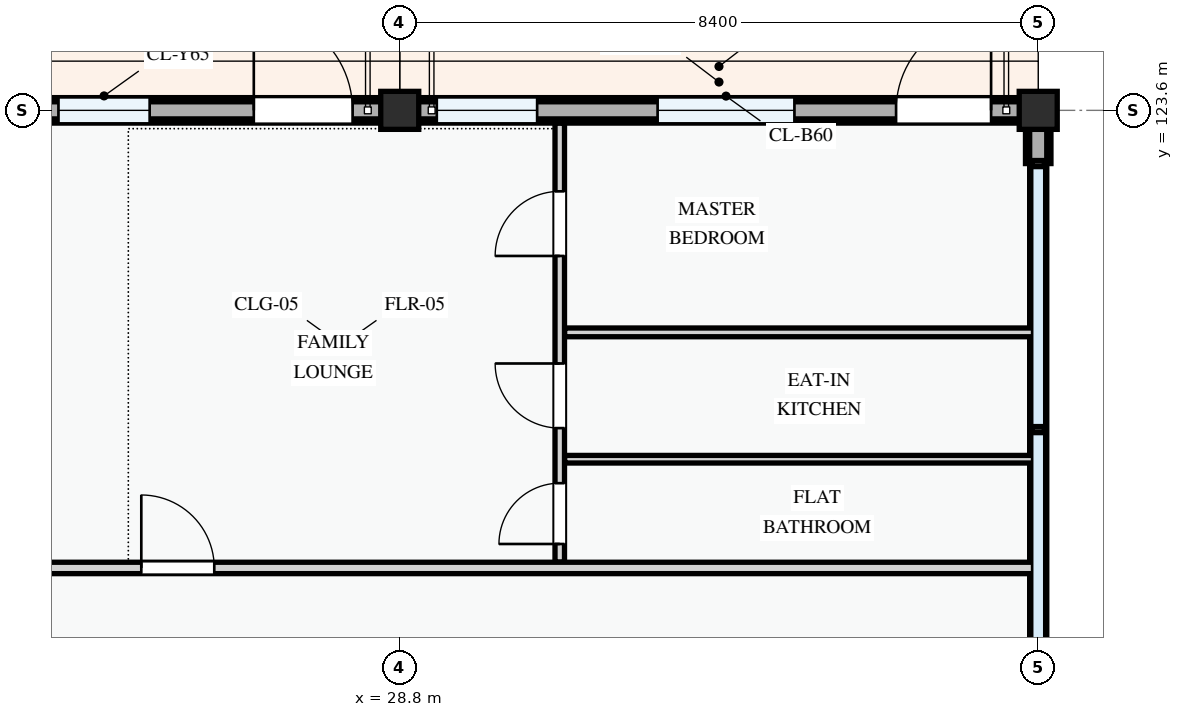
"""IFC4 building model, lengths in metres.
Left out: names, types, materials, properties, quantities, classifications, styles, units other than length and angle.
Written with IfcOpenShell. Run it as: python <this file> out.ifc"""

import sys

from ifc_helpers import new_model, si_unit, direction, frame, frame_2d, origin, origin_2d, place, context, subcontext, project, spatial, polyline, rectangle, outline, extrude, element, fill, save


model = new_model("IFC4")
c1 = context("Model", 3, precision=1e-05, world=origin(), true_north=direction((0.0, 1.0)))
c2 = subcontext(c1, "Body", "Model", "MODEL_VIEW")
j1 = project(units=[si_unit("LENGTHUNIT", "METRE"), si_unit("PLANEANGLEUNIT", "RADIAN")], contexts=[c1])
p1 = place(None, origin())
s1 = spatial("IfcSite", under=j1, at=p1, CompositionType="ELEMENT")
p2 = place(p1, origin())
s2 = spatial("IfcBuilding", under=s1, at=p2, CompositionType="ELEMENT")
p3 = place(p2, frame((0.0, 0.0, 51.0)))
s3 = spatial("IfcBuildingStorey", under=s2, at=p3, CompositionType="ELEMENT", Elevation=51.0)
for number, where, z_axis, x_axis in (
    (1, (28.8, 123.6, 0.0), (0.0, 0.0, 1.0), (1.0, 0.0, 0.0)),
    (2, (37.2, 123.6, 0.0), (0.0, 0.0, 1.0), (1.0, 0.0, 0.0)),
):
    element("IfcColumn", number, at=place(p3, frame(where, z_axis=z_axis, x_axis=x_axis)), inside=s3, PredefinedType="COLUMN", context=c2, shape_type="SweptSolid", body=[
        extrude(rectangle(XDim=0.5, YDim=0.5, at=origin_2d()), origin(), (0.0, 0.0, 1.0), 3.3),
    ])
p4 = place(p3, frame((37.2, 122.9, 0.0), z_axis=(0.0, 0.0, 1.0), x_axis=(0.0, 1.0, 0.0)))
e3 = element("IfcWall", 3, at=p4, inside=s3, PredefinedType="STANDARD", context=c2, shape_type="SweptSolid", body=[
    extrude(rectangle(XDim=0.531, YDim=0.335, at=frame_2d((0.265, 0.0))), origin(), (0.0, 0.0, 1.0), 2.445),
])
p5 = place(p3, frame((37.2, 123.6, 0.0), z_axis=(0.0, 0.0, 1.0), x_axis=(-1.0, 0.0, 0.0)))
e4 = element("IfcWall", 4, at=p5, inside=s3, PredefinedType="STANDARD", context=c2, shape_type="SweptSolid", body=[
    extrude(rectangle(XDim=8.4, YDim=0.335, at=frame_2d((4.2, 0.0))), origin(), (0.0, 0.0, 1.0), 2.395),
])
p6 = place(p5, frame((0.62, 0.0, 0.0)))
e5 = element("IfcOpeningElement", 5, at=p6, cuts=e4, PredefinedType="OPENING", context=c2, shape_type="SweptSolid", body=[
    extrude(rectangle(XDim=1.25, YDim=2.2, at=frame_2d((0.625, 1.1))), frame((0.0, 0.177, 0.0), z_axis=(0.0, -1.0, 0.0), x_axis=(1.0, 0.0, 0.0)), (0.0, 0.0, 1.0), 0.355),
])
p7 = place(p5, frame((3.208, 0.0, 0.78)))
e6 = element("IfcOpeningElement", 6, at=p7, cuts=e4, PredefinedType="OPENING", context=c2, shape_type="SweptSolid", body=[
    extrude(rectangle(XDim=1.8, YDim=1.5, at=frame_2d((0.9, 0.75))), frame((0.0, 0.177, 0.0), z_axis=(0.0, -1.0, 0.0), x_axis=(1.0, 0.0, 0.0)), (0.0, 0.0, 1.0), 0.355),
])
p8 = place(p5, frame((6.592, 0.0, 0.78)))
e7 = element("IfcOpeningElement", 7, at=p8, cuts=e4, PredefinedType="OPENING", context=c2, shape_type="SweptSolid", body=[
    extrude(rectangle(XDim=1.32, YDim=1.35, at=frame_2d((0.66, 0.675))), frame((0.0, 0.177, 0.0), z_axis=(0.0, -1.0, 0.0), x_axis=(1.0, 0.0, 0.0)), (0.0, 0.0, 1.0), 0.355),
])
p9 = place(p3, frame((28.8, 123.6, 0.0), z_axis=(0.0, 0.0, 1.0), x_axis=(-1.0, 0.0, 0.0)))
e8 = element("IfcWall", 8, at=p9, inside=s3, PredefinedType="STANDARD", context=c2, shape_type="SweptSolid", body=[
    extrude(rectangle(XDim=6.0, YDim=0.335, at=frame_2d((3.0, 0.0))), origin(), (0.0, 0.0, 1.0), 2.545),
])
p10 = place(p9, frame((0.62, 0.0, 0.0)))
e9 = element("IfcOpeningElement", 9, at=p10, cuts=e8, PredefinedType="OPENING", context=c2, shape_type="SweptSolid", body=[
    extrude(rectangle(XDim=1.3, YDim=2.15, at=frame_2d((0.65, 1.075))), frame((0.0, 0.177, 0.0), z_axis=(0.0, -1.0, 0.0), x_axis=(1.0, 0.0, 0.0)), (0.0, 0.0, 1.0), 0.355),
])
p11 = place(p9, frame((3.29, 0.0, 0.78)))
e10 = element("IfcOpeningElement", 10, at=p11, cuts=e8, PredefinedType="OPENING", context=c2, shape_type="SweptSolid", body=[
    extrude(rectangle(XDim=1.2, YDim=1.35, at=frame_2d((0.6, 0.675))), frame((0.0, 0.177, 0.0), z_axis=(0.0, -1.0, 0.0), x_axis=(1.0, 0.0, 0.0)), (0.0, 0.0, 1.0), 0.355),
])
p12 = place(p3, frame((37.2, 109.2, 3.3), z_axis=(0.0, 0.0, 1.0), x_axis=(0.0, 1.0, 0.0)))
e11 = element("IfcWall", 11, at=p12, inside=s3, PredefinedType="PARAPET", context=c2, shape_type="SweptSolid", body=[
    extrude(rectangle(XDim=14.4, YDim=0.225, at=frame_2d((7.2, 0.0))), origin(), (0.0, 0.0, 1.0), 1.15),
])
p13 = place(p3, frame((37.2, 123.6, 3.3), z_axis=(0.0, 0.0, 1.0), x_axis=(-1.0, 0.0, 0.0)))
e12 = element("IfcWall", 12, at=p13, inside=s3, PredefinedType="PARAPET", context=c2, shape_type="SweptSolid", body=[
    extrude(outline(polyline([(0.0, 0.0), (8.4, 0.0), (8.4, 1.12), (7.7, 1.322), (7.0, 1.484), (6.3, 1.618), (5.6, 1.717), (4.9, 1.779), (4.2, 1.8), (3.5, 1.779), (2.8, 1.717), (2.1, 1.618), (1.4, 1.484), (0.7, 1.322), (0.0, 1.12), (0.0, 0.0)])), frame((0.0, 0.113, 0.0), z_axis=(0.0, -1.0, 0.0), x_axis=(1.0, 0.0, 0.0)), (0.0, 0.0, 1.0), 0.225),
])
p14 = place(p3, frame((28.8, 123.6, 3.3), z_axis=(0.0, 0.0, 1.0), x_axis=(-1.0, 0.0, 0.0)))
e13 = element("IfcWall", 13, at=p14, inside=s3, PredefinedType="PARAPET", context=c2, shape_type="SweptSolid", body=[
    extrude(outline(polyline([(0.0, 0.0), (6.0, 0.0), (6.0, 1.12), (5.5, 1.322), (5.0, 1.484), (4.5, 1.618), (4.0, 1.717), (3.5, 1.779), (3.0, 1.8), (2.5, 1.779), (2.0, 1.717), (1.5, 1.618), (1.0, 1.484), (0.5, 1.322), (0.0, 1.12), (0.0, 0.0)])), frame((0.0, 0.113, 0.0), z_axis=(0.0, -1.0, 0.0), x_axis=(1.0, 0.0, 0.0)), (0.0, 0.0, 1.0), 0.225),
])
p15 = place(p3, frame((30.905, 117.657, 0.0), z_axis=(0.0, 0.0, 1.0), x_axis=(0.0, 1.0, 0.0)))
e14 = element("IfcWall", 14, at=p15, inside=s3, PredefinedType="PARTITIONING", context=c2, shape_type="SweptSolid", body=[
    extrude(rectangle(XDim=5.773, YDim=0.125, at=frame_2d((2.887, 0.0))), origin(), (0.0, 0.0, 1.0), 3.0),
])
p16 = place(p15, frame((0.238, 0.0, 0.0)))
e15 = element("IfcOpeningElement", 15, at=p16, cuts=e14, PredefinedType="OPENING", context=c2, shape_type="SweptSolid", body=[
    extrude(rectangle(XDim=0.8, YDim=2.1, at=frame_2d((0.4, 1.05))), frame((0.0, 0.073, 0.0), z_axis=(0.0, -1.0, 0.0), x_axis=(1.0, 0.0, 0.0)), (0.0, 0.0, 1.0), 0.145),
])
p17 = place(p15, frame((1.763, 0.0, 0.0)))
e16 = element("IfcOpeningElement", 16, at=p17, cuts=e14, PredefinedType="OPENING", context=c2, shape_type="SweptSolid", body=[
    extrude(rectangle(XDim=0.85, YDim=2.1, at=frame_2d((0.425, 1.05))), frame((0.0, 0.073, 0.0), z_axis=(0.0, -1.0, 0.0), x_axis=(1.0, 0.0, 0.0)), (0.0, 0.0, 1.0), 0.145),
])
p18 = place(p15, frame((4.028, 0.0, 0.0)))
e17 = element("IfcOpeningElement", 17, at=p18, cuts=e14, PredefinedType="OPENING", context=c2, shape_type="SweptSolid", body=[
    extrude(rectangle(XDim=0.85, YDim=2.1, at=frame_2d((0.425, 1.05))), frame((0.0, 0.073, 0.0), z_axis=(0.0, -1.0, 0.0), x_axis=(1.0, 0.0, 0.0)), (0.0, 0.0, 1.0), 0.145),
])
p19 = place(p3, frame((30.97, 120.679, 0.0), z_axis=(0.0, 0.0, 1.0), x_axis=(1.0, 0.0, 0.0)))
e18 = element("IfcWall", 18, at=p19, inside=s3, PredefinedType="PARTITIONING", context=c2, shape_type="SweptSolid", body=[
    extrude(rectangle(XDim=6.17, YDim=0.115, at=frame_2d((3.085, 0.0))), origin(), (0.0, 0.0, 1.0), 3.0),
])
p20 = place(p3, frame((30.97, 119.01, 0.0), z_axis=(0.0, 0.0, 1.0), x_axis=(1.0, 0.0, 0.0)))
e19 = element("IfcWall", 19, at=p20, inside=s3, PredefinedType="PARTITIONING", context=c2, shape_type="SweptSolid", body=[
    extrude(rectangle(XDim=6.17, YDim=0.1, at=frame_2d((3.085, 0.0))), origin(), (0.0, 0.0, 1.0), 3.0),
])
p21 = place(p3, frame((22.66, 117.58, 0.0), z_axis=(0.0, 0.0, 1.0), x_axis=(1.0, 0.0, 0.0)))
e20 = element("IfcWall", 20, at=p21, inside=s3, PredefinedType="PARTITIONING", context=c2, shape_type="SweptSolid", body=[
    extrude(rectangle(XDim=14.48, YDim=0.15, at=frame_2d((7.24, 0.0))), origin(), (0.0, 0.0, 1.0), 3.0),
])
p22 = place(p21, frame((2.74, 0.0, 0.0)))
e21 = element("IfcOpeningElement", 21, at=p22, cuts=e20, PredefinedType="OPENING", context=c2, shape_type="SweptSolid", body=[
    extrude(rectangle(XDim=0.96, YDim=2.12, at=frame_2d((0.48, 1.06))), frame((0.0, 0.085, 0.0), z_axis=(0.0, -1.0, 0.0), x_axis=(1.0, 0.0, 0.0)), (0.0, 0.0, 1.0), 0.17),
])
p23 = place(p6, frame((1.25, 0.0, 0.0), z_axis=(0.0, 0.0, 1.0), x_axis=(-1.0, 0.0, 0.0)))
e22 = element("IfcDoor", 22, at=p23, inside=s3, OperationType="SINGLE_SWING_RIGHT", PredefinedType="DOOR", context=c2, shape_type="SweptSolid", body=[
    extrude(rectangle(XDim=1.25, YDim=2.2, at=frame_2d((0.625, 1.1))), frame((0.0, 0.025, 0.0), z_axis=(0.0, -1.0, 0.0), x_axis=(1.0, 0.0, 0.0)), (0.0, 0.0, 1.0), 0.05),
])
fill(e5, e22)
p24 = place(p7, origin())
e23 = element("IfcWindow", 23, at=p24, inside=s3, PartitioningType="DOUBLE_PANEL_VERTICAL", PredefinedType="WINDOW", context=c2, shape_type="SweptSolid", body=[
    extrude(rectangle(XDim=1.8, YDim=1.5, at=frame_2d((0.9, 0.75))), frame((0.0, 0.03, 0.0), z_axis=(0.0, -1.0, 0.0), x_axis=(1.0, 0.0, 0.0)), (0.0, 0.0, 1.0), 0.06),
])
fill(e6, e23)
p25 = place(p8, origin())
e24 = element("IfcWindow", 24, at=p25, inside=s3, PartitioningType="SINGLE_PANEL", PredefinedType="WINDOW", context=c2, shape_type="SweptSolid", body=[
    extrude(rectangle(XDim=1.32, YDim=1.35, at=frame_2d((0.66, 0.675))), frame((0.0, 0.03, 0.0), z_axis=(0.0, -1.0, 0.0), x_axis=(1.0, 0.0, 0.0)), (0.0, 0.0, 1.0), 0.06),
])
fill(e7, e24)
p26 = place(p10, frame((1.3, 0.0, 0.0), z_axis=(0.0, 0.0, 1.0), x_axis=(-1.0, 0.0, 0.0)))
e25 = element("IfcDoor", 25, at=p26, inside=s3, OperationType="SINGLE_SWING_LEFT", PredefinedType="DOOR", context=c2, shape_type="SweptSolid", body=[
    extrude(rectangle(XDim=1.3, YDim=2.15, at=frame_2d((0.65, 1.075))), frame((0.0, 0.025, 0.0), z_axis=(0.0, -1.0, 0.0), x_axis=(1.0, 0.0, 0.0)), (0.0, 0.0, 1.0), 0.05),
])
fill(e9, e25)
p27 = place(p11, origin())
e26 = element("IfcWindow", 26, at=p27, inside=s3, PartitioningType="SINGLE_PANEL", PredefinedType="WINDOW", context=c2, shape_type="SweptSolid", body=[
    extrude(rectangle(XDim=1.2, YDim=1.35, at=frame_2d((0.6, 0.675))), frame((0.0, 0.03, 0.0), z_axis=(0.0, -1.0, 0.0), x_axis=(1.0, 0.0, 0.0)), (0.0, 0.0, 1.0), 0.06),
])
fill(e10, e26)
p28 = place(p16, origin())
e27 = element("IfcDoor", 27, at=p28, inside=s3, OperationType="SINGLE_SWING_LEFT", PredefinedType="DOOR", context=c2, shape_type="SweptSolid", body=[
    extrude(rectangle(XDim=0.8, YDim=2.1, at=frame_2d((0.4, 1.05))), frame((0.0, 0.025, 0.0), z_axis=(0.0, -1.0, 0.0), x_axis=(1.0, 0.0, 0.0)), (0.0, 0.0, 1.0), 0.05),
])
fill(e15, e27)
p29 = place(p17, origin())
e28 = element("IfcDoor", 28, at=p29, inside=s3, OperationType="SINGLE_SWING_RIGHT", PredefinedType="DOOR", context=c2, shape_type="SweptSolid", body=[
    extrude(rectangle(XDim=0.85, YDim=2.1, at=frame_2d((0.425, 1.05))), frame((0.0, 0.025, 0.0), z_axis=(0.0, -1.0, 0.0), x_axis=(1.0, 0.0, 0.0)), (0.0, 0.0, 1.0), 0.05),
])
fill(e16, e28)
p30 = place(p18, origin())
e29 = element("IfcDoor", 29, at=p30, inside=s3, OperationType="SINGLE_SWING_LEFT", PredefinedType="DOOR", context=c2, shape_type="SweptSolid", body=[
    extrude(rectangle(XDim=0.85, YDim=2.1, at=frame_2d((0.425, 1.05))), frame((0.0, 0.025, 0.0), z_axis=(0.0, -1.0, 0.0), x_axis=(1.0, 0.0, 0.0)), (0.0, 0.0, 1.0), 0.05),
])
fill(e17, e29)
p31 = place(p22, origin())
e30 = element("IfcDoor", 30, at=p31, inside=s3, OperationType="SINGLE_SWING_LEFT", PredefinedType="DOOR", context=c2, shape_type="SweptSolid", body=[
    extrude(rectangle(XDim=0.96, YDim=2.12, at=frame_2d((0.48, 1.06))), frame((0.0, 0.025, 0.0), z_axis=(0.0, -1.0, 0.0), x_axis=(1.0, 0.0, 0.0)), (0.0, 0.0, 1.0), 0.05),
])
fill(e21, e30)
save(model, sys.argv[1])
